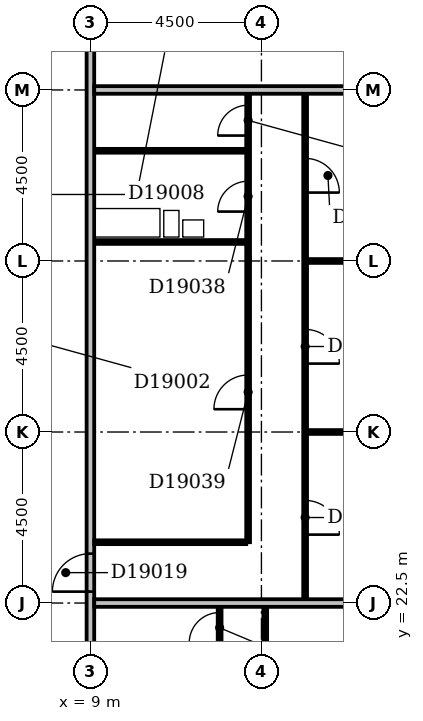
"""IFC4 building model, lengths in metres.
Left out: names, types, materials, properties, quantities, classifications, styles, units other than length and angle.
Written with IfcOpenShell. Run it as: python <this file> out.ifc"""

import sys

from ifc_helpers import new_model, si_unit, direction, frame, frame_2d, origin, place, context, subcontext, project, spatial, rectangle, extrude, element, fill, save


model = new_model("IFC4")
c1 = context("Model", 3, precision=1e-05, world=origin(), true_north=direction((0.0, 1.0)))
c2 = subcontext(c1, "Body", "Model", "MODEL_VIEW")
j1 = project(units=[si_unit("LENGTHUNIT", "METRE"), si_unit("PLANEANGLEUNIT", "RADIAN")], contexts=[c1])
p1 = place(None, origin())
s1 = spatial("IfcSite", under=j1, at=p1, CompositionType="ELEMENT")
p2 = place(p1, origin())
s2 = spatial("IfcBuilding", under=s1, at=p2, CompositionType="ELEMENT")
p3 = place(p2, frame((0.0, 0.0, 79.4)))
s3 = spatial("IfcBuildingStorey", under=s2, at=p3, CompositionType="ELEMENT", Elevation=79.4)
p4 = place(p3, frame((9.0, 5.0, 0.0), z_axis=(0.0, 0.0, 1.0), x_axis=(0.0, 1.0, 0.0)))
e1 = element("IfcWall", 1, at=p4, inside=s3, PredefinedType="PARTITIONING", context=c2, shape_type="SweptSolid", body=[
    extrude(rectangle(XDim=44.5, YDim=0.2, at=frame_2d((22.25, 0.0))), origin(), (0.0, 0.0, 1.0), 3.3),
])
p5 = place(p4, frame((17.8, 0.0, 0.0)))
e2 = element("IfcOpeningElement", 2, at=p5, cuts=e1, PredefinedType="OPENING", context=c2, shape_type="SweptSolid", body=[
    extrude(rectangle(XDim=1.0, YDim=2.1, at=frame_2d((0.5, 1.05))), frame((0.0, 0.112, 0.0), z_axis=(0.0, -1.0, 0.0), x_axis=(1.0, 0.0, 0.0)), (0.0, 0.0, 1.0), 0.224),
])
p6 = place(p4, frame((14.95, 0.0, 0.0)))
e3 = element("IfcOpeningElement", 3, at=p6, cuts=e1, PredefinedType="OPENING", context=c2, shape_type="SweptSolid", body=[
    extrude(rectangle(XDim=1.0, YDim=2.1, at=frame_2d((0.5, 1.05))), frame((0.0, 0.112, 0.0), z_axis=(0.0, -1.0, 0.0), x_axis=(1.0, 0.0, 0.0)), (0.0, 0.0, 1.0), 0.224),
])
p7 = place(p4, frame((10.45, 0.0, 0.0)))
e4 = element("IfcOpeningElement", 4, at=p7, cuts=e1, PredefinedType="OPENING", context=c2, shape_type="SweptSolid", body=[
    extrude(rectangle(XDim=1.0, YDim=2.1, at=frame_2d((0.5, 1.05))), frame((0.0, 0.112, 0.0), z_axis=(0.0, -1.0, 0.0), x_axis=(1.0, 0.0, 0.0)), (0.0, 0.0, 1.0), 0.224),
])
p8 = place(p4, frame((5.95, 0.0, 0.0)))
e5 = element("IfcOpeningElement", 5, at=p8, cuts=e1, PredefinedType="OPENING", context=c2, shape_type="SweptSolid", body=[
    extrude(rectangle(XDim=1.0, YDim=2.1, at=frame_2d((0.5, 1.05))), frame((0.0, 0.112, 0.0), z_axis=(0.0, -1.0, 0.0), x_axis=(1.0, 0.0, 0.0)), (0.0, 0.0, 1.0), 0.224),
])
p9 = place(p4, frame((35.0, 0.0, 0.0)))
e6 = element("IfcOpeningElement", 6, at=p9, cuts=e1, PredefinedType="OPENING", context=c2, shape_type="SweptSolid", body=[
    extrude(rectangle(XDim=0.9, YDim=2.1, at=frame_2d((0.45, 1.05))), frame((0.0, 0.112, 0.0), z_axis=(0.0, -1.0, 0.0), x_axis=(1.0, 0.0, 0.0)), (0.0, 0.0, 1.0), 0.224),
])
p10 = place(p4, frame((1.5, 0.0, 0.0)))
e7 = element("IfcOpeningElement", 7, at=p10, cuts=e1, PredefinedType="OPENING", context=c2, shape_type="SweptSolid", body=[
    extrude(rectangle(XDim=0.9, YDim=2.1, at=frame_2d((0.45, 1.05))), frame((0.0, 0.112, 0.0), z_axis=(0.0, -1.0, 0.0), x_axis=(1.0, 0.0, 0.0)), (0.0, 0.0, 1.0), 0.224),
])
p11 = place(p3, frame((13.6, 18.1, 0.0), z_axis=(0.0, 0.0, 1.0), x_axis=(0.0, 1.0, 0.0)))
e8 = element("IfcWall", 8, at=p11, inside=s3, PredefinedType="PARTITIONING", context=c2, shape_type="SweptSolid", body=[
    extrude(rectangle(XDim=4.3, YDim=0.1, at=frame_2d((2.15, 0.0))), origin(), (0.0, 0.0, 1.0), 3.3),
])
p12 = place(p11, frame((1.7, 0.0, 0.0)))
e9 = element("IfcOpeningElement", 9, at=p12, cuts=e8, PredefinedType="OPENING", context=c2, shape_type="SweptSolid", body=[
    extrude(rectangle(XDim=0.9, YDim=2.1, at=frame_2d((0.45, 1.05))), frame((0.0, 0.062, 0.0), z_axis=(0.0, -1.0, 0.0), x_axis=(1.0, 0.0, 0.0)), (0.0, 0.0, 1.0), 0.124),
])
p13 = place(p3, frame((12.4, 21.2, 0.0), z_axis=(0.0, 0.0, 1.0), x_axis=(0.0, 1.0, 0.0)))
e10 = element("IfcWall", 10, at=p13, inside=s3, PredefinedType="PARTITIONING", context=c2, shape_type="SweptSolid", body=[
    extrude(rectangle(XDim=1.2, YDim=0.1, at=frame_2d((0.6, 0.0))), origin(), (0.0, 0.0, 1.0), 3.3),
])
p14 = place(p13, frame((0.25, 0.0, 0.0)))
e11 = element("IfcOpeningElement", 11, at=p14, cuts=e10, PredefinedType="OPENING", context=c2, shape_type="SweptSolid", body=[
    extrude(rectangle(XDim=0.8, YDim=2.1, at=frame_2d((0.4, 1.05))), frame((0.0, 0.062, 0.0), z_axis=(0.0, -1.0, 0.0), x_axis=(1.0, 0.0, 0.0)), (0.0, 0.0, 1.0), 0.124),
])
p15 = place(p3, frame((9.1, 22.5, 0.0), z_axis=(0.0, 0.0, 1.0), x_axis=(1.0, 0.0, 0.0)))
e12 = element("IfcWall", 12, at=p15, inside=s3, PredefinedType="PARTITIONING", context=c2, shape_type="SweptSolid", body=[
    extrude(rectangle(XDim=12.8, YDim=0.2, at=frame_2d((6.4, 0.0))), origin(), (0.0, 0.0, 1.0), 3.3),
])
p16 = place(p3, frame((14.65, 22.6, 0.0), z_axis=(0.0, 0.0, 1.0), x_axis=(0.0, 1.0, 0.0)))
e13 = element("IfcWall", 13, at=p16, inside=s3, PredefinedType="PARTITIONING", context=c2, shape_type="SweptSolid", body=[
    extrude(rectangle(XDim=13.3, YDim=0.1, at=frame_2d((6.65, 0.0))), origin(), (0.0, 0.0, 1.0), 3.3),
])
p17 = place(p16, frame((1.7, 0.0, 0.0)))
e14 = element("IfcOpeningElement", 14, at=p17, cuts=e13, PredefinedType="OPENING", context=c2, shape_type="SweptSolid", body=[
    extrude(rectangle(XDim=0.9, YDim=2.1, at=frame_2d((0.45, 1.05))), frame((0.0, 0.062, 0.0), z_axis=(0.0, -1.0, 0.0), x_axis=(1.0, 0.0, 0.0)), (0.0, 0.0, 1.0), 0.124),
])
p18 = place(p16, frame((6.2, 0.0, 0.0)))
e15 = element("IfcOpeningElement", 15, at=p18, cuts=e13, PredefinedType="OPENING", context=c2, shape_type="SweptSolid", body=[
    extrude(rectangle(XDim=0.9, YDim=2.1, at=frame_2d((0.45, 1.05))), frame((0.0, 0.062, 0.0), z_axis=(0.0, -1.0, 0.0), x_axis=(1.0, 0.0, 0.0)), (0.0, 0.0, 1.0), 0.124),
])
p19 = place(p16, frame((10.7, 0.0, 0.0)))
e16 = element("IfcOpeningElement", 16, at=p19, cuts=e13, PredefinedType="OPENING", context=c2, shape_type="SweptSolid", body=[
    extrude(rectangle(XDim=0.9, YDim=2.1, at=frame_2d((0.45, 1.05))), frame((0.0, 0.062, 0.0), z_axis=(0.0, -1.0, 0.0), x_axis=(1.0, 0.0, 0.0)), (0.0, 0.0, 1.0), 0.124),
])
p20 = place(p3, frame((9.1, 24.1, 0.0), z_axis=(0.0, 0.0, 1.0), x_axis=(1.0, 0.0, 0.0)))
e17 = element("IfcWall", 17, at=p20, inside=s3, PredefinedType="PARTITIONING", context=c2, shape_type="SweptSolid", body=[
    extrude(rectangle(XDim=4.0, YDim=0.1, at=frame_2d((2.0, 0.0))), origin(), (0.0, 0.0, 1.0), 3.3),
])
p21 = place(p3, frame((13.15, 24.1, 0.0), z_axis=(0.0, 0.0, 1.0), x_axis=(0.0, 1.0, 0.0)))
e18 = element("IfcWall", 18, at=p21, inside=s3, PredefinedType="PARTITIONING", context=c2, shape_type="SweptSolid", body=[
    extrude(rectangle(XDim=11.8, YDim=0.1, at=frame_2d((5.9, 0.0))), origin(), (0.0, 0.0, 1.0), 3.3),
])
p22 = place(p21, frame((8.7, 0.0, 0.0)))
e19 = element("IfcOpeningElement", 19, at=p22, cuts=e18, PredefinedType="OPENING", context=c2, shape_type="SweptSolid", body=[
    extrude(rectangle(XDim=0.8, YDim=2.1, at=frame_2d((0.4, 1.05))), frame((0.0, 0.062, 0.0), z_axis=(0.0, -1.0, 0.0), x_axis=(1.0, 0.0, 0.0)), (0.0, 0.0, 1.0), 0.124),
])
p23 = place(p21, frame((3.5, 0.0, 0.0)))
e20 = element("IfcOpeningElement", 20, at=p23, cuts=e18, PredefinedType="OPENING", context=c2, shape_type="SweptSolid", body=[
    extrude(rectangle(XDim=0.9, YDim=2.1, at=frame_2d((0.45, 1.05))), frame((0.0, 0.062, 0.0), z_axis=(0.0, -1.0, 0.0), x_axis=(1.0, 0.0, 0.0)), (0.0, 0.0, 1.0), 0.124),
])
p24 = place(p21, frame((10.7, 0.0, 0.0)))
e21 = element("IfcOpeningElement", 21, at=p24, cuts=e18, PredefinedType="OPENING", context=c2, shape_type="SweptSolid", body=[
    extrude(rectangle(XDim=0.8, YDim=2.1, at=frame_2d((0.4, 1.05))), frame((0.0, 0.062, 0.0), z_axis=(0.0, -1.0, 0.0), x_axis=(1.0, 0.0, 0.0)), (0.0, 0.0, 1.0), 0.124),
])
p25 = place(p3, frame((14.7, 27.0, 0.0), z_axis=(0.0, 0.0, 1.0), x_axis=(1.0, 0.0, 0.0)))
e22 = element("IfcWall", 22, at=p25, inside=s3, PredefinedType="PARTITIONING", context=c2, shape_type="SweptSolid", body=[
    extrude(rectangle(XDim=7.2, YDim=0.1, at=frame_2d((3.6, 0.0))), origin(), (0.0, 0.0, 1.0), 2.7),
])
p26 = place(p3, frame((14.7, 31.5, 0.0), z_axis=(0.0, 0.0, 1.0), x_axis=(1.0, 0.0, 0.0)))
e23 = element("IfcWall", 23, at=p26, inside=s3, PredefinedType="PARTITIONING", context=c2, shape_type="SweptSolid", body=[
    extrude(rectangle(XDim=7.2, YDim=0.1, at=frame_2d((3.6, 0.0))), origin(), (0.0, 0.0, 1.0), 3.3),
])
for number, where, z_axis, x_axis in (
    (24, (9.1, 32.0, 0.0), (0.0, 0.0, 1.0), (1.0, 0.0, 0.0)),
    (25, (9.1, 34.4, 0.0), (0.0, 0.0, 1.0), (1.0, 0.0, 0.0)),
):
    element("IfcWall", number, at=place(p3, frame(where, z_axis=z_axis, x_axis=x_axis)), inside=s3, PredefinedType="PLUMBINGWALL", context=c2, shape_type="SweptSolid", body=[
        extrude(rectangle(XDim=4.0, YDim=0.1, at=frame_2d((2.0, 0.0))), origin(), (0.0, 0.0, 1.0), 3.3),
    ])
p27 = place(p3, frame((9.1, 36.0, 0.0), z_axis=(0.0, 0.0, 1.0), x_axis=(1.0, 0.0, 0.0)))
e26 = element("IfcWall", 26, at=p27, inside=s3, PredefinedType="PARTITIONING", context=c2, shape_type="SweptSolid", body=[
    extrude(rectangle(XDim=12.8, YDim=0.2, at=frame_2d((6.4, 0.0))), origin(), (0.0, 0.0, 1.0), 2.4),
])
p28 = place(p5, origin())
e27 = element("IfcDoor", 27, at=p28, inside=s3, OperationType="SINGLE_SWING_LEFT", PredefinedType="DOOR", context=c2, shape_type="SweptSolid", body=[
    extrude(rectangle(XDim=1.0, YDim=2.1, at=frame_2d((0.5, 1.05))), frame((0.0, 0.025, 0.0), z_axis=(0.0, -1.0, 0.0), x_axis=(1.0, 0.0, 0.0)), (0.0, 0.0, 1.0), 0.05),
])
fill(e2, e27)
p29 = place(p14, origin())
e28 = element("IfcDoor", 28, at=p29, inside=s3, OperationType="SINGLE_SWING_LEFT", PredefinedType="DOOR", context=c2, shape_type="SweptSolid", body=[
    extrude(rectangle(XDim=0.8, YDim=2.1, at=frame_2d((0.4, 1.05))), frame((0.0, 0.025, 0.0), z_axis=(0.0, -1.0, 0.0), x_axis=(1.0, 0.0, 0.0)), (0.0, 0.0, 1.0), 0.05),
])
fill(e11, e28)
p30 = place(p17, frame((0.9, 0.0, 0.0), z_axis=(0.0, 0.0, 1.0), x_axis=(-1.0, 0.0, 0.0)))
e29 = element("IfcDoor", 29, at=p30, inside=s3, OperationType="SINGLE_SWING_RIGHT", PredefinedType="DOOR", context=c2, shape_type="SweptSolid", body=[
    extrude(rectangle(XDim=0.9, YDim=2.1, at=frame_2d((0.45, 1.05))), frame((0.0, 0.025, 0.0), z_axis=(0.0, -1.0, 0.0), x_axis=(1.0, 0.0, 0.0)), (0.0, 0.0, 1.0), 0.05),
])
fill(e14, e29)
p31 = place(p18, frame((0.9, 0.0, 0.0), z_axis=(0.0, 0.0, 1.0), x_axis=(-1.0, 0.0, 0.0)))
e30 = element("IfcDoor", 30, at=p31, inside=s3, OperationType="SINGLE_SWING_RIGHT", PredefinedType="DOOR", context=c2, shape_type="SweptSolid", body=[
    extrude(rectangle(XDim=0.9, YDim=2.1, at=frame_2d((0.45, 1.05))), frame((0.0, 0.025, 0.0), z_axis=(0.0, -1.0, 0.0), x_axis=(1.0, 0.0, 0.0)), (0.0, 0.0, 1.0), 0.05),
])
fill(e15, e30)
p32 = place(p19, frame((0.9, 0.0, 0.0), z_axis=(0.0, 0.0, 1.0), x_axis=(-1.0, 0.0, 0.0)))
e31 = element("IfcDoor", 31, at=p32, inside=s3, OperationType="SINGLE_SWING_RIGHT", PredefinedType="DOOR", context=c2, shape_type="SweptSolid", body=[
    extrude(rectangle(XDim=0.9, YDim=2.1, at=frame_2d((0.45, 1.05))), frame((0.0, 0.025, 0.0), z_axis=(0.0, -1.0, 0.0), x_axis=(1.0, 0.0, 0.0)), (0.0, 0.0, 1.0), 0.05),
])
fill(e16, e31)
p33 = place(p22, origin())
e32 = element("IfcDoor", 32, at=p33, inside=s3, OperationType="SINGLE_SWING_LEFT", PredefinedType="DOOR", context=c2, shape_type="SweptSolid", body=[
    extrude(rectangle(XDim=0.8, YDim=2.1, at=frame_2d((0.4, 1.05))), frame((0.0, 0.025, 0.0), z_axis=(0.0, -1.0, 0.0), x_axis=(1.0, 0.0, 0.0)), (0.0, 0.0, 1.0), 0.05),
])
fill(e19, e32)
p34 = place(p23, origin())
e33 = element("IfcDoor", 33, at=p34, inside=s3, OperationType="SINGLE_SWING_LEFT", PredefinedType="DOOR", context=c2, shape_type="SweptSolid", body=[
    extrude(rectangle(XDim=0.9, YDim=2.1, at=frame_2d((0.45, 1.05))), frame((0.0, 0.025, 0.0), z_axis=(0.0, -1.0, 0.0), x_axis=(1.0, 0.0, 0.0)), (0.0, 0.0, 1.0), 0.05),
])
fill(e20, e33)
p35 = place(p24, origin())
e34 = element("IfcDoor", 34, at=p35, inside=s3, OperationType="SINGLE_SWING_LEFT", PredefinedType="DOOR", context=c2, shape_type="SweptSolid", body=[
    extrude(rectangle(XDim=0.8, YDim=2.1, at=frame_2d((0.4, 1.05))), frame((0.0, 0.025, 0.0), z_axis=(0.0, -1.0, 0.0), x_axis=(1.0, 0.0, 0.0)), (0.0, 0.0, 1.0), 0.05),
])
fill(e21, e34)
save(model, sys.argv[1])
